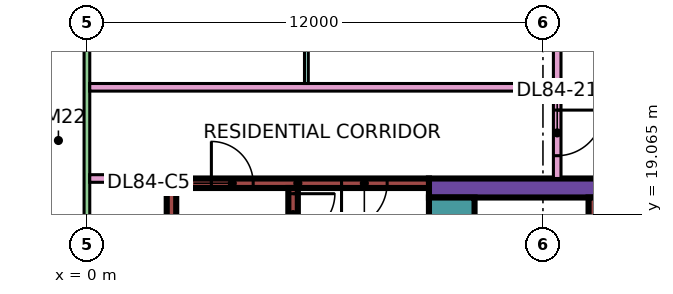
"""IFC4 building model, lengths in metres.
Left out: names, types, materials, properties, quantities, classifications, styles, units other than length and angle.
Written with IfcOpenShell. Run it as: python <this file> out.ifc"""

import sys

from ifc_helpers import new_model, si_unit, direction, frame, frame_2d, origin, place, context, subcontext, project, spatial, rectangle, extrude, element, fill, save


model = new_model("IFC4")
c1 = context("Model", 3, precision=1e-05, world=origin(), true_north=direction((0.0, 1.0)))
c2 = subcontext(c1, "Body", "Model", "MODEL_VIEW")
j1 = project(units=[si_unit("LENGTHUNIT", "METRE"), si_unit("PLANEANGLEUNIT", "RADIAN")], contexts=[c1])
p1 = place(None, origin())
s1 = spatial("IfcSite", under=j1, at=p1, CompositionType="ELEMENT")
p2 = place(p1, origin())
s2 = spatial("IfcBuilding", under=s1, at=p2, CompositionType="ELEMENT")
p3 = place(p2, frame((0.0, 0.0, 361.4)))
s3 = spatial("IfcBuildingStorey", under=s2, at=p3, CompositionType="ELEMENT", Elevation=361.4)
p4 = place(p3, frame((9.0, 19.75, 0.0), z_axis=(0.0, 0.0, 1.0), x_axis=(1.0, 0.0, 0.0)))
e1 = element("IfcWall", 1, at=p4, inside=s3, PredefinedType="SHEAR", context=c2, shape_type="SweptSolid", body=[
    extrude(rectangle(XDim=25.0, YDim=0.5, at=frame_2d((12.5, 0.0))), origin(), (0.0, 0.0, 1.0), 3.75),
])
p5 = place(p4, frame((19.1, 0.0, 0.0)))
e2 = element("IfcOpeningElement", 2, at=p5, cuts=e1, PredefinedType="OPENING", context=c2, shape_type="SweptSolid", body=[
    extrude(rectangle(XDim=1.8, YDim=2.4, at=frame_2d((0.9, 1.2))), frame((0.0, 0.26, 0.0), z_axis=(0.0, -1.0, 0.0), x_axis=(1.0, 0.0, 0.0)), (0.0, 0.0, 1.0), 0.52),
])
p6 = place(p3, frame((9.6, 7.5, 0.0), z_axis=(0.0, 0.0, 1.0), x_axis=(0.0, 1.0, 0.0)))
e3 = element("IfcWall", 3, at=p6, inside=s3, PredefinedType="SHEAR", context=c2, shape_type="SweptSolid", body=[
    extrude(rectangle(XDim=12.0, YDim=1.2, at=frame_2d((6.0, 0.0))), origin(), (0.0, 0.0, 1.0), 3.75),
])
p7 = place(p6, frame((4.375, 0.0, 0.0)))
e4 = element("IfcOpeningElement", 4, at=p7, cuts=e3, PredefinedType="OPENING", context=c2, shape_type="SweptSolid", body=[
    extrude(rectangle(XDim=1.1, YDim=2.2, at=frame_2d((0.55, 1.1))), frame((0.0, 0.61, 0.0), z_axis=(0.0, -1.0, 0.0), x_axis=(1.0, 0.0, 0.0)), (0.0, 0.0, 1.0), 1.22),
])
p8 = place(p6, frame((6.875, 0.0, 0.0)))
e5 = element("IfcOpeningElement", 5, at=p8, cuts=e3, PredefinedType="OPENING", context=c2, shape_type="SweptSolid", body=[
    extrude(rectangle(XDim=1.1, YDim=2.2, at=frame_2d((0.55, 1.1))), frame((0.0, 0.61, 0.0), z_axis=(0.0, -1.0, 0.0), x_axis=(1.0, 0.0, 0.0)), (0.0, 0.0, 1.0), 1.22),
])
p9 = place(p6, frame((9.85, 0.0, 0.0)))
e6 = element("IfcOpeningElement", 6, at=p9, cuts=e3, PredefinedType="OPENING", context=c2, shape_type="SweptSolid", body=[
    extrude(rectangle(XDim=1.1, YDim=2.2, at=frame_2d((0.55, 1.1))), frame((0.0, 0.61, 0.0), z_axis=(0.0, -1.0, 0.0), x_axis=(1.0, 0.0, 0.0)), (0.0, 0.0, 1.0), 1.22),
])
p10 = place(p6, frame((2.05, 0.0, 0.0)))
e7 = element("IfcOpeningElement", 7, at=p10, cuts=e3, PredefinedType="OPENING", context=c2, shape_type="SweptSolid", body=[
    extrude(rectangle(XDim=0.9, YDim=2.1, at=frame_2d((0.45, 1.05))), frame((0.0, 0.61, 0.0), z_axis=(0.0, -1.0, 0.0), x_axis=(1.0, 0.0, 0.0)), (0.0, 0.0, 1.0), 1.22),
])
p11 = place(p3, frame((13.325, 7.5, 0.0), z_axis=(0.0, 0.0, 1.0), x_axis=(0.0, 1.0, 0.0)))
e8 = element("IfcWall", 8, at=p11, inside=s3, PredefinedType="SHEAR", context=c2, shape_type="SweptSolid", body=[
    extrude(rectangle(XDim=12.0, YDim=0.25, at=frame_2d((6.0, 0.0))), origin(), (0.0, 0.0, 1.0), 3.75),
])
p12 = place(p3, frame((2.1, 19.875, 0.0), z_axis=(0.0, 0.0, 1.0), x_axis=(1.0, 0.0, 0.0)))
e9 = element("IfcWall", 9, at=p12, inside=s3, PredefinedType="SHEAR", context=c2, shape_type="SweptSolid", body=[
    extrude(rectangle(XDim=6.9, YDim=0.25, at=frame_2d((3.45, 0.0))), origin(), (0.0, 0.0, 1.0), 3.75),
])
p13 = place(p12, frame((1.175, 0.0, 0.0)))
e10 = element("IfcOpeningElement", 10, at=p13, cuts=e9, PredefinedType="OPENING", context=c2, shape_type="SweptSolid", body=[
    extrude(rectangle(XDim=1.1, YDim=2.2, at=frame_2d((0.55, 1.1))), frame((0.0, 0.135, 0.0), z_axis=(0.0, -1.0, 0.0), x_axis=(1.0, 0.0, 0.0)), (0.0, 0.0, 1.0), 0.27),
])
p14 = place(p12, frame((4.6, 0.0, 0.0)))
e11 = element("IfcOpeningElement", 11, at=p14, cuts=e9, PredefinedType="OPENING", context=c2, shape_type="SweptSolid", body=[
    extrude(rectangle(XDim=1.2, YDim=2.2, at=frame_2d((0.6, 1.1))), frame((0.0, 0.135, 0.0), z_axis=(0.0, -1.0, 0.0), x_axis=(1.0, 0.0, 0.0)), (0.0, 0.0, 1.0), 0.27),
])
p15 = place(p3, frame((2.225, 13.25, 0.0), z_axis=(0.0, 0.0, 1.0), x_axis=(0.0, 1.0, 0.0)))
e12 = element("IfcWall", 12, at=p15, inside=s3, PredefinedType="SHEAR", context=c2, shape_type="SweptSolid", body=[
    extrude(rectangle(XDim=6.5, YDim=0.25, at=frame_2d((3.25, 0.0))), origin(), (0.0, 0.0, 1.0), 3.75),
])
p16 = place(p3, frame((5.425, 13.25, 0.0), z_axis=(0.0, 0.0, 1.0), x_axis=(0.0, 1.0, 0.0)))
e13 = element("IfcWall", 13, at=p16, inside=s3, PredefinedType="SHEAR", context=c2, shape_type="SweptSolid", body=[
    extrude(rectangle(XDim=6.5, YDim=0.25, at=frame_2d((3.25, 0.0))), origin(), (0.0, 0.0, 1.0), 3.75),
])
p17 = place(p16, frame((5.25, 0.0, 0.0)))
e14 = element("IfcOpeningElement", 14, at=p17, cuts=e13, PredefinedType="OPENING", context=c2, shape_type="SweptSolid", body=[
    extrude(rectangle(XDim=1.1, YDim=2.2, at=frame_2d((0.55, 1.1))), frame((0.0, 0.135, 0.0), z_axis=(0.0, -1.0, 0.0), x_axis=(1.0, 0.0, 0.0)), (0.0, 0.0, 1.0), 0.27),
])
p18 = place(p3, frame((0.0, 23.925, 0.0), z_axis=(0.0, 0.0, 1.0), x_axis=(0.0, -1.0, 0.0)))
e15 = element("IfcWall", 15, at=p18, inside=s3, PredefinedType="SOLIDWALL", context=c2, shape_type="SweptSolid", body=[
    extrude(rectangle(XDim=11.35, YDim=0.15, at=frame_2d((5.675, 0.0))), origin(), (0.0, 0.0, 1.0), 3.35),
])
p19 = place(p18, frame((6.738, 0.0, 0.0)))
e16 = element("IfcOpeningElement", 16, at=p19, cuts=e15, PredefinedType="OPENING", context=c2, shape_type="SweptSolid", body=[
    extrude(rectangle(XDim=1.8, YDim=2.4, at=frame_2d((0.9, 1.2))), frame((0.0, 0.085, 0.0), z_axis=(0.0, -1.0, 0.0), x_axis=(1.0, 0.0, 0.0)), (0.0, 0.0, 1.0), 0.17),
])
p20 = place(p3, frame((0.074, 20.0, 0.0), z_axis=(0.0, 0.0, 1.0), x_axis=(1.0, 0.0, 0.0)))
e17 = element("IfcWall", 17, at=p20, inside=s3, PredefinedType="PARTITIONING", context=c2, shape_type="SweptSolid", body=[
    extrude(rectangle(XDim=2.026, YDim=0.2, at=frame_2d((1.013, 0.0))), origin(), (0.0, 0.0, 1.0), 3.35),
])
p21 = place(p3, frame((0.074, 22.4, 0.0), z_axis=(0.0, 0.0, 1.0), x_axis=(1.0, 0.0, 0.0)))
e18 = element("IfcWall", 18, at=p21, inside=s3, PredefinedType="PARTITIONING", context=c2, shape_type="SweptSolid", body=[
    extrude(rectangle(XDim=12.201, YDim=0.2, at=frame_2d((6.101, 0.0))), origin(), (0.0, 0.0, 1.0), 3.35),
])
p22 = place(p3, frame((5.775, 22.5, 0.0), z_axis=(0.0, 0.0, 1.0), x_axis=(0.0, 1.0, 0.0)))
e19 = element("IfcWall", 19, at=p22, inside=s3, PredefinedType="PARTITIONING", context=c2, shape_type="SweptSolid", body=[
    extrude(rectangle(XDim=4.45, YDim=0.1, at=frame_2d((2.225, 0.0))), origin(), (0.0, 0.0, 1.0), 3.35),
])
p23 = place(p3, frame((12.375, 20.0, 0.0), z_axis=(0.0, 0.0, 1.0), x_axis=(0.0, 1.0, 0.0)))
e20 = element("IfcWall", 20, at=p23, inside=s3, PredefinedType="PARTITIONING", context=c2, shape_type="SweptSolid", body=[
    extrude(rectangle(XDim=33.926, YDim=0.2, at=frame_2d((16.963, 0.0))), origin(), (0.0, 0.0, 1.0), 3.35),
])
p24 = place(p23, frame((29.4, 0.0, 0.0)))
e21 = element("IfcOpeningElement", 21, at=p24, cuts=e20, PredefinedType="OPENING", context=c2, shape_type="SweptSolid", body=[
    extrude(rectangle(XDim=1.0, YDim=2.1, at=frame_2d((0.5, 1.05))), frame((0.0, 0.11, 0.0), z_axis=(0.0, -1.0, 0.0), x_axis=(1.0, 0.0, 0.0)), (0.0, 0.0, 1.0), 0.22),
])
p25 = place(p23, frame((0.6, 0.0, 0.0)))
e22 = element("IfcOpeningElement", 22, at=p25, cuts=e20, PredefinedType="OPENING", context=c2, shape_type="SweptSolid", body=[
    extrude(rectangle(XDim=1.2, YDim=2.1, at=frame_2d((0.6, 1.05))), frame((0.0, 0.11, 0.0), z_axis=(0.0, -1.0, 0.0), x_axis=(1.0, 0.0, 0.0)), (0.0, 0.0, 1.0), 0.22),
])
p26 = place(p23, frame((4.5, 0.0, 0.0)))
e23 = element("IfcOpeningElement", 23, at=p26, cuts=e20, PredefinedType="OPENING", context=c2, shape_type="SweptSolid", body=[
    extrude(rectangle(XDim=1.0, YDim=2.1, at=frame_2d((0.5, 1.05))), frame((0.0, 0.11, 0.0), z_axis=(0.0, -1.0, 0.0), x_axis=(1.0, 0.0, 0.0)), (0.0, 0.0, 1.0), 0.22),
])
p27 = place(p17, origin())
e24 = element("IfcDoor", 24, at=p27, inside=s3, OperationType="SINGLE_SWING_RIGHT", PredefinedType="DOOR", context=c2, shape_type="SweptSolid", body=[
    extrude(rectangle(XDim=1.1, YDim=2.2, at=frame_2d((0.55, 1.1))), frame((0.0, 0.025, 0.0), z_axis=(0.0, -1.0, 0.0), x_axis=(1.0, 0.0, 0.0)), (0.0, 0.0, 1.0), 0.05),
])
fill(e14, e24)
p28 = place(p13, origin())
e25 = element("IfcDoor", 25, at=p28, inside=s3, OperationType="SINGLE_SWING_LEFT", PredefinedType="DOOR", context=c2, shape_type="SweptSolid", body=[
    extrude(rectangle(XDim=1.1, YDim=2.2, at=frame_2d((0.55, 1.1))), frame((0.0, 0.025, 0.0), z_axis=(0.0, -1.0, 0.0), x_axis=(1.0, 0.0, 0.0)), (0.0, 0.0, 1.0), 0.05),
])
fill(e10, e25)
p29 = place(p14, frame((1.2, 0.0, 0.0), z_axis=(0.0, 0.0, 1.0), x_axis=(-1.0, 0.0, 0.0)))
e26 = element("IfcDoor", 26, at=p29, inside=s3, OperationType="SINGLE_SWING_LEFT", PredefinedType="DOOR", context=c2, shape_type="SweptSolid", body=[
    extrude(rectangle(XDim=1.2, YDim=2.2, at=frame_2d((0.6, 1.1))), frame((0.0, 0.025, 0.0), z_axis=(0.0, -1.0, 0.0), x_axis=(1.0, 0.0, 0.0)), (0.0, 0.0, 1.0), 0.05),
])
fill(e11, e26)
p30 = place(p25, origin())
e27 = element("IfcDoor", 27, at=p30, inside=s3, OperationType="SINGLE_SWING_RIGHT", PredefinedType="DOOR", context=c2, shape_type="SweptSolid", body=[
    extrude(rectangle(XDim=1.2, YDim=2.1, at=frame_2d((0.6, 1.05))), frame((0.0, 0.025, 0.0), z_axis=(0.0, -1.0, 0.0), x_axis=(1.0, 0.0, 0.0)), (0.0, 0.0, 1.0), 0.05),
])
fill(e22, e27)
save(model, sys.argv[1])
